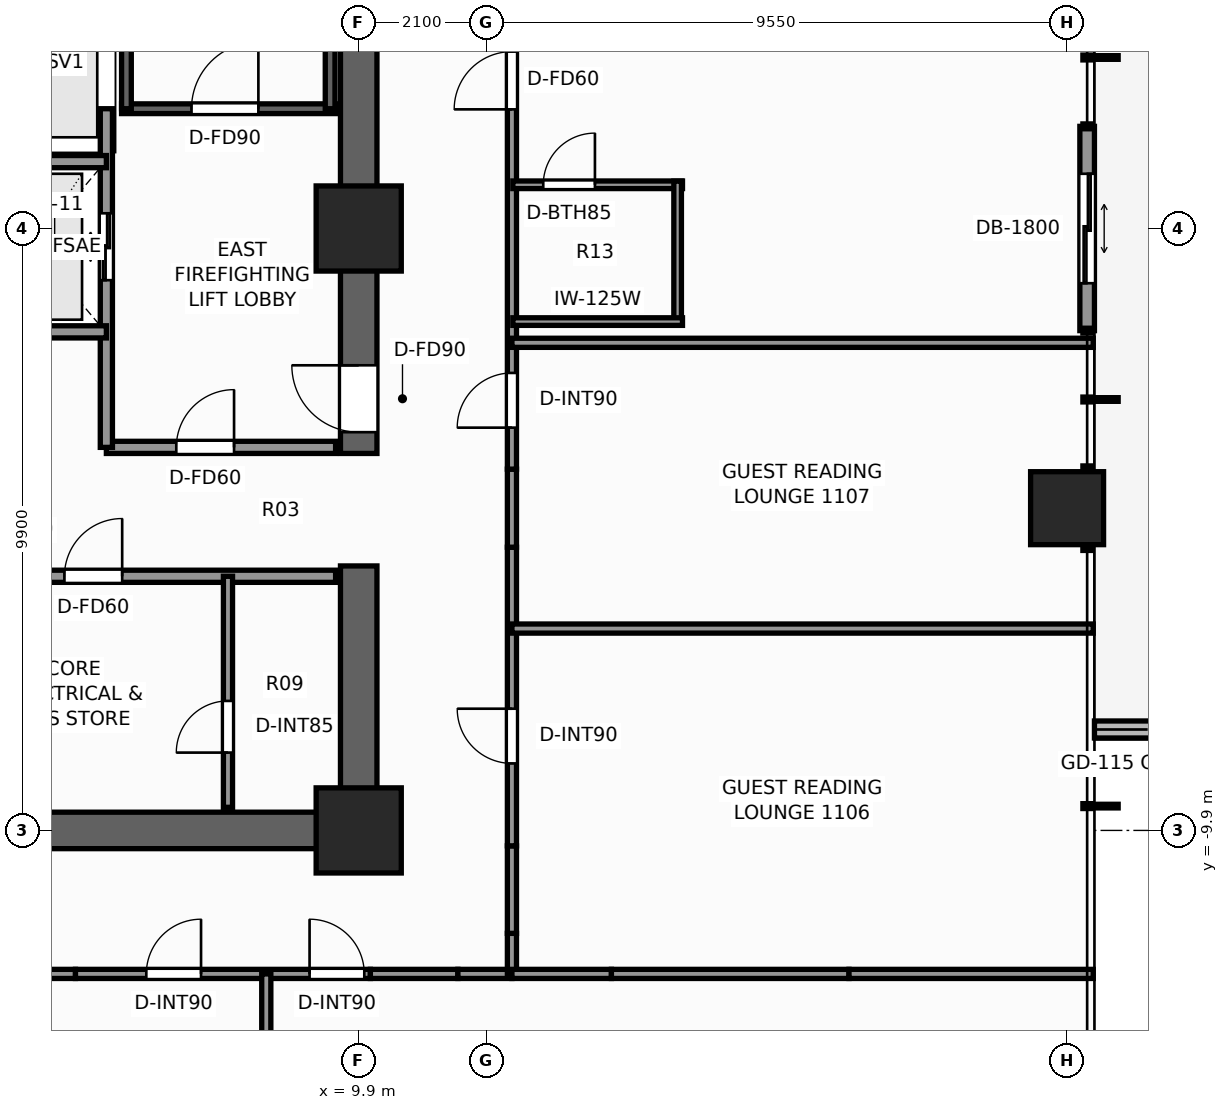
"""IFC4 building model, lengths in metres.
Left out: names, types, materials, properties, quantities, classifications, styles, units other than length and angle.
Written with IfcOpenShell. Run it as: python <this file> out.ifc"""

import sys

from ifc_helpers import new_model, si_unit, direction, frame, frame_2d, origin, origin_2d, place, context, subcontext, project, spatial, rectangle, extrude, element, fill, save


model = new_model("IFC4")
c1 = context("Model", 3, precision=1e-05, world=origin(), true_north=direction((0.0, 1.0)))
c2 = subcontext(c1, "Body", "Model", "MODEL_VIEW")
j1 = project(units=[si_unit("LENGTHUNIT", "METRE"), si_unit("PLANEANGLEUNIT", "RADIAN")], contexts=[c1])
p1 = place(None, origin())
s1 = spatial("IfcSite", under=j1, at=p1, CompositionType="ELEMENT")
p2 = place(p1, origin())
s2 = spatial("IfcBuilding", under=s1, at=p2, CompositionType="ELEMENT")
p3 = place(p2, frame((0.0, 0.0, 40.3)))
s3 = spatial("IfcBuildingStorey", under=s2, at=p3, CompositionType="ELEMENT", Elevation=40.3)
p4 = place(p3, frame((10.2, -9.9, 0.0), z_axis=(0.0, 0.0, 1.0), x_axis=(-1.0, 0.0, 0.0)))
e1 = element("IfcWall", 1, at=p4, inside=s3, PredefinedType="SHEAR", context=c2, shape_type="SweptSolid", body=[
    extrude(rectangle(XDim=12.06, YDim=0.6, at=frame_2d((6.03, 0.0))), origin(), (0.0, 0.0, 1.0), 3.3),
])
p5 = place(p3, frame((9.9, -9.6, 0.0), z_axis=(0.0, 0.0, 1.0), x_axis=(0.0, 1.0, 0.0)))
e2 = element("IfcWall", 2, at=p5, inside=s3, PredefinedType="SHEAR", context=c2, shape_type="SweptSolid", body=[
    extrude(rectangle(XDim=4.05, YDim=0.6, at=frame_2d((2.025, 0.0))), origin(), (0.0, 0.0, 1.0), 3.3),
])
p6 = place(p3, frame((9.9, -3.7, 0.0), z_axis=(0.0, 0.0, 1.0), x_axis=(0.0, 1.0, 0.0)))
e3 = element("IfcWall", 3, at=p6, inside=s3, PredefinedType="SHEAR", context=c2, shape_type="SweptSolid", body=[
    extrude(rectangle(XDim=13.3, YDim=0.6, at=frame_2d((6.65, 0.0))), origin(), (0.0, 0.0, 1.0), 3.3),
])
p7 = place(p6, frame((0.35, 0.0, 0.0)))
e4 = element("IfcOpeningElement", 4, at=p7, cuts=e3, PredefinedType="OPENING", context=c2, shape_type="SweptSolid", body=[
    extrude(rectangle(XDim=1.1, YDim=2.2, at=frame_2d((0.55, 1.1))), frame((0.0, 0.31, 0.0), z_axis=(0.0, -1.0, 0.0), x_axis=(1.0, 0.0, 0.0)), (0.0, 0.0, 1.0), 0.62),
])
for number, where, z_axis, x_axis in (
    (5, (9.9, -9.9, 0.0), (0.0, 0.0, 1.0), (1.0, 0.0, 0.0)),
    (6, (9.9, 0.0, 0.0), (0.0, 0.0, 1.0), (1.0, 0.0, 0.0)),
):
    element("IfcColumn", number, at=place(p3, frame(where, z_axis=z_axis, x_axis=x_axis)), inside=s3, PredefinedType="COLUMN", context=c2, shape_type="SweptSolid", body=[
        extrude(rectangle(XDim=1.4, YDim=1.4, at=origin_2d()), origin(), (0.0, 0.0, 1.0), 3.3),
    ])
p8 = place(p3, frame((21.55, -4.6, 0.0), z_axis=(0.0, 0.0, 1.0), x_axis=(1.0, 0.0, 0.0)))
e7 = element("IfcColumn", 7, at=p8, inside=s3, PredefinedType="COLUMN", context=c2, shape_type="SweptSolid", body=[
    extrude(rectangle(XDim=1.2, YDim=1.2, at=origin_2d()), origin(), (0.0, 0.0, 1.0), 3.3),
])
p9 = place(p3, frame((22.0, -8.24, -0.06), z_axis=(0.0, 0.0, 1.0), x_axis=(1.0, 0.0, 0.0)))
e8 = element("IfcWall", 8, at=p9, inside=s3, PredefinedType="PARAPET", context=c2, shape_type="SweptSolid", body=[
    extrude(rectangle(XDim=1.313, YDim=0.28, at=frame_2d((0.656, 0.0))), origin(), (0.0, 0.0, 1.0), 0.42),
])
p10 = place(p3, frame((21.88, 1.68, 0.0), z_axis=(0.0, 0.0, 1.0), x_axis=(0.0, -1.0, 0.0)))
e9 = element("IfcWall", 9, at=p10, inside=s3, PredefinedType="STANDARD", context=c2, shape_type="SweptSolid", body=[
    extrude(rectangle(XDim=3.36, YDim=0.24, at=frame_2d((1.68, 0.0))), origin(), (0.0, 0.0, 1.0), 3.06),
])
p11 = place(p10, frame((0.78, 0.0, 0.0)))
e10 = element("IfcOpeningElement", 10, at=p11, cuts=e9, PredefinedType="OPENING", context=c2, shape_type="SweptSolid", body=[
    extrude(rectangle(XDim=1.8, YDim=2.2, at=frame_2d((0.9, 1.1))), frame((0.0, 0.13, 0.0), z_axis=(0.0, -1.0, 0.0), x_axis=(1.0, 0.0, 0.0)), (0.0, 0.0, 1.0), 0.26),
])
p12 = place(p3, frame((6.0, 1.97, 0.0), z_axis=(0.0, 0.0, 1.0), x_axis=(1.0, 0.0, 0.0)))
e11 = element("IfcWall", 11, at=p12, inside=s3, PredefinedType="SHEAR", context=c2, shape_type="SweptSolid", body=[
    extrude(rectangle(XDim=3.52, YDim=0.16, at=frame_2d((1.76, 0.0))), origin(), (0.0, 0.0, 1.0), 3.3),
])
p13 = place(p12, frame((1.15, 0.0, 0.0)))
e12 = element("IfcOpeningElement", 12, at=p13, cuts=e11, PredefinedType="OPENING", context=c2, shape_type="SweptSolid", body=[
    extrude(rectangle(XDim=1.1, YDim=2.2, at=frame_2d((0.55, 1.1))), frame((0.0, 0.09, 0.0), z_axis=(0.0, -1.0, 0.0), x_axis=(1.0, 0.0, 0.0)), (0.0, 0.0, 1.0), 0.18),
])
for number, where, z_axis, x_axis in (
    (13, (6.08, 1.97, 0.0), (0.0, 0.0, 1.0), (0.0, 1.0, 0.0)),
    (14, (9.43, 1.97, 0.0), (0.0, 0.0, 1.0), (0.0, 1.0, 0.0)),
):
    element("IfcWall", number, at=place(p3, frame(where, z_axis=z_axis, x_axis=x_axis)), inside=s3, PredefinedType="SHEAR", context=c2, shape_type="SweptSolid", body=[
        extrude(rectangle(XDim=7.56, YDim=0.16, at=frame_2d((3.78, 0.0))), origin(), (0.0, 0.0, 1.0), 3.3),
    ])
p14 = place(p3, frame((5.75, -3.6, 0.0), z_axis=(0.0, 0.0, 1.0), x_axis=(1.0, 0.0, 0.0)))
e15 = element("IfcWall", 15, at=p14, inside=s3, PredefinedType="SOLIDWALL", context=c2, shape_type="SweptSolid", body=[
    extrude(rectangle(XDim=3.77, YDim=0.2, at=frame_2d((1.885, 0.0))), origin(), (0.0, 0.0, 1.0), 3.06),
])
p15 = place(p14, frame((1.15, 0.0, 0.0)))
e16 = element("IfcOpeningElement", 16, at=p15, cuts=e15, PredefinedType="OPENING", context=c2, shape_type="SweptSolid", body=[
    extrude(rectangle(XDim=0.95, YDim=2.06, at=frame_2d((0.475, 1.03))), frame((0.0, 0.11, 0.0), z_axis=(0.0, -1.0, 0.0), x_axis=(1.0, 0.0, 0.0)), (0.0, 0.0, 1.0), 0.22),
])
p16 = place(p3, frame((5.75, -3.6, 0.0), z_axis=(0.0, 0.0, 1.0), x_axis=(0.0, 1.0, 0.0)))
e17 = element("IfcWall", 17, at=p16, inside=s3, PredefinedType="SOLIDWALL", context=c2, shape_type="SweptSolid", body=[
    extrude(rectangle(XDim=5.57, YDim=0.2, at=frame_2d((2.785, 0.0))), origin(), (0.0, 0.0, 1.0), 3.06),
])
p17 = place(p16, frame((2.75, 0.0, 0.0)))
e18 = element("IfcOpeningElement", 18, at=p17, cuts=e17, PredefinedType="OPENING", context=c2, shape_type="SweptSolid", body=[
    extrude(rectangle(XDim=1.1, YDim=2.2, at=frame_2d((0.55, 1.1))), frame((0.0, 0.11, 0.0), z_axis=(0.0, -1.0, 0.0), x_axis=(1.0, 0.0, 0.0)), (0.0, 0.0, 1.0), 0.22),
])
for number, where, z_axis, x_axis in (
    (19, (3.35, -1.7, 0.0), (0.0, 0.0, 1.0), (1.0, 0.0, 0.0)),
    (20, (3.35, 1.1, 0.0), (0.0, 0.0, 1.0), (1.0, 0.0, 0.0)),
):
    element("IfcWall", number, at=place(p3, frame(where, z_axis=z_axis, x_axis=x_axis)), inside=s3, PredefinedType="SOLIDWALL", context=c2, shape_type="SweptSolid", body=[
        extrude(rectangle(XDim=2.4, YDim=0.2, at=frame_2d((1.2, 0.0))), origin(), (0.0, 0.0, 1.0), 3.06),
    ])
p18 = place(p3, frame((3.86, -5.72, 0.0), z_axis=(0.0, 0.0, 1.0), x_axis=(1.0, 0.0, 0.0)))
e21 = element("IfcWall", 21, at=p18, inside=s3, PredefinedType="SOLIDWALL", context=c2, shape_type="SweptSolid", body=[
    extrude(rectangle(XDim=5.66, YDim=0.2, at=frame_2d((2.83, 0.0))), origin(), (0.0, 0.0, 1.0), 3.06),
])
p19 = place(p18, frame((1.2, 0.0, 0.0)))
e22 = element("IfcOpeningElement", 22, at=p19, cuts=e21, PredefinedType="OPENING", context=c2, shape_type="SweptSolid", body=[
    extrude(rectangle(XDim=0.95, YDim=2.06, at=frame_2d((0.475, 1.03))), frame((0.0, 0.11, 0.0), z_axis=(0.0, -1.0, 0.0), x_axis=(1.0, 0.0, 0.0)), (0.0, 0.0, 1.0), 0.22),
])
p20 = place(p3, frame((7.75, -9.52, 0.0), z_axis=(0.0, 0.0, 1.0), x_axis=(0.0, 1.0, 0.0)))
e23 = element("IfcWall", 23, at=p20, inside=s3, PredefinedType="PARTITIONING", context=c2, shape_type="SweptSolid", body=[
    extrude(rectangle(XDim=3.8, YDim=0.15, at=frame_2d((1.9, 0.0))), origin(), (0.0, 0.0, 1.0), 3.06),
])
p21 = place(p20, frame((0.9, 0.0, 0.0)))
e24 = element("IfcOpeningElement", 24, at=p21, cuts=e23, PredefinedType="OPENING", context=c2, shape_type="SweptSolid", body=[
    extrude(rectangle(XDim=0.85, YDim=2.03, at=frame_2d((0.425, 1.015))), frame((0.0, 0.085, 0.0), z_axis=(0.0, -1.0, 0.0), x_axis=(1.0, 0.0, 0.0)), (0.0, 0.0, 1.0), 0.17),
])
p22 = place(p3, frame((3.958, -12.26, 0.0), z_axis=(0.0, 0.0, 1.0), x_axis=(1.0, 0.0, 0.0)))
e25 = element("IfcWall", 25, at=p22, inside=s3, PredefinedType="PARTITIONING", context=c2, shape_type="SweptSolid", body=[
    extrude(rectangle(XDim=1.284, YDim=0.15, at=frame_2d((0.642, 0.0))), origin(), (0.0, 0.0, 1.0), 1.245),
])
p23 = place(p3, frame((5.242, -12.26, 0.0), z_axis=(0.0, 0.0, 1.0), x_axis=(1.0, 0.0, 0.0)))
e26 = element("IfcWall", 26, at=p23, inside=s3, PredefinedType="PARTITIONING", context=c2, shape_type="SweptSolid", body=[
    extrude(rectangle(XDim=4.85, YDim=0.15, at=frame_2d((2.425, 0.0))), origin(), (0.0, 0.0, 1.0), 3.06),
])
p24 = place(p23, frame((1.165, 0.0, 0.0)))
e27 = element("IfcOpeningElement", 27, at=p24, cuts=e26, PredefinedType="OPENING", context=c2, shape_type="SweptSolid", body=[
    extrude(rectangle(XDim=0.9, YDim=2.06, at=frame_2d((0.45, 1.03))), frame((0.0, 0.085, 0.0), z_axis=(0.0, -1.0, 0.0), x_axis=(1.0, 0.0, 0.0)), (0.0, 0.0, 1.0), 0.17),
])
p25 = place(p23, frame((3.85, 0.0, 0.0)))
e28 = element("IfcOpeningElement", 28, at=p25, cuts=e26, PredefinedType="OPENING", context=c2, shape_type="SweptSolid", body=[
    extrude(rectangle(XDim=0.9, YDim=2.06, at=frame_2d((0.45, 1.03))), frame((0.0, 0.085, 0.0), z_axis=(0.0, -1.0, 0.0), x_axis=(1.0, 0.0, 0.0)), (0.0, 0.0, 1.0), 0.17),
])
p26 = place(p3, frame((10.092, -12.26, 0.0), z_axis=(0.0, 0.0, 1.0), x_axis=(1.0, 0.0, 0.0)))
e29 = element("IfcWall", 29, at=p26, inside=s3, PredefinedType="PARTITIONING", context=c2, shape_type="SweptSolid", body=[
    extrude(rectangle(XDim=1.439, YDim=0.15, at=frame_2d((0.72, 0.0))), origin(), (0.0, 0.0, 1.0), 1.245),
])
p27 = place(p3, frame((11.531, -12.26, 0.0), z_axis=(0.0, 0.0, 1.0), x_axis=(1.0, 0.0, 0.0)))
e30 = element("IfcWall", 30, at=p27, inside=s3, PredefinedType="PARTITIONING", context=c2, shape_type="SweptSolid", body=[
    extrude(rectangle(XDim=0.889, YDim=0.15, at=frame_2d((0.444, 0.0))), origin(), (0.0, 0.0, 1.0), 3.06),
])
p28 = place(p3, frame((12.42, -12.26, 0.0), z_axis=(0.0, 0.0, 1.0), x_axis=(0.0, 1.0, 0.0)))
e31 = element("IfcWall", 31, at=p28, inside=s3, PredefinedType="PARTITIONING", context=c2, shape_type="SweptSolid", body=[
    extrude(rectangle(XDim=0.667, YDim=0.15, at=frame_2d((0.333, 0.0))), origin(), (0.0, 0.0, 1.0), 3.06),
])
p29 = place(p3, frame((12.42, -11.593, 0.0), z_axis=(0.0, 0.0, 1.0), x_axis=(0.0, 1.0, 0.0)))
e32 = element("IfcWall", 32, at=p29, inside=s3, PredefinedType="PARTITIONING", context=c2, shape_type="SweptSolid", body=[
    extrude(rectangle(XDim=1.439, YDim=0.15, at=frame_2d((0.72, 0.0))), origin(), (0.0, 0.0, 1.0), 1.245),
])
p30 = place(p3, frame((12.42, -10.154, 0.0), z_axis=(0.0, 0.0, 1.0), x_axis=(0.0, 1.0, 0.0)))
e33 = element("IfcWall", 33, at=p30, inside=s3, PredefinedType="PARTITIONING", context=c2, shape_type="SweptSolid", body=[
    extrude(rectangle(XDim=4.912, YDim=0.15, at=frame_2d((2.456, 0.0))), origin(), (0.0, 0.0, 1.0), 3.06),
])
p31 = place(p30, frame((1.356, 0.0, 0.0)))
e34 = element("IfcOpeningElement", 34, at=p31, cuts=e33, PredefinedType="OPENING", context=c2, shape_type="SweptSolid", body=[
    extrude(rectangle(XDim=0.9, YDim=2.06, at=frame_2d((0.45, 1.03))), frame((0.0, 0.085, 0.0), z_axis=(0.0, -1.0, 0.0), x_axis=(1.0, 0.0, 0.0)), (0.0, 0.0, 1.0), 0.17),
])
p32 = place(p3, frame((12.42, -5.242, 0.0), z_axis=(0.0, 0.0, 1.0), x_axis=(0.0, 1.0, 0.0)))
e35 = element("IfcWall", 35, at=p32, inside=s3, PredefinedType="PARTITIONING", context=c2, shape_type="SweptSolid", body=[
    extrude(rectangle(XDim=1.284, YDim=0.15, at=frame_2d((0.642, 0.0))), origin(), (0.0, 0.0, 1.0), 1.245),
])
p33 = place(p3, frame((12.42, -3.958, 0.0), z_axis=(0.0, 0.0, 1.0), x_axis=(0.0, 1.0, 0.0)))
e36 = element("IfcWall", 36, at=p33, inside=s3, PredefinedType="PARTITIONING", context=c2, shape_type="SweptSolid", body=[
    extrude(rectangle(XDim=7.916, YDim=0.15, at=frame_2d((3.958, 0.0))), origin(), (0.0, 0.0, 1.0), 2.585),
])
p34 = place(p33, frame((0.682, 0.0, 0.0)))
e37 = element("IfcOpeningElement", 37, at=p34, cuts=e36, PredefinedType="OPENING", context=c2, shape_type="SweptSolid", body=[
    extrude(rectangle(XDim=0.9, YDim=2.06, at=frame_2d((0.45, 1.03))), frame((0.0, 0.085, 0.0), z_axis=(0.0, -1.0, 0.0), x_axis=(1.0, 0.0, 0.0)), (0.0, 0.0, 1.0), 0.17),
])
p35 = place(p33, frame((5.917, 0.0, 0.0)))
e38 = element("IfcOpeningElement", 38, at=p35, cuts=e36, PredefinedType="OPENING", context=c2, shape_type="SweptSolid", body=[
    extrude(rectangle(XDim=0.95, YDim=2.06, at=frame_2d((0.475, 1.03))), frame((0.0, 0.085, 0.0), z_axis=(0.0, -1.0, 0.0), x_axis=(1.0, 0.0, 0.0)), (0.0, 0.0, 1.0), 0.17),
])
p36 = place(p3, frame((12.42, -12.26, 0.0), z_axis=(0.0, 0.0, 1.0), x_axis=(1.0, 0.0, 0.0)))
e39 = element("IfcWall", 39, at=p36, inside=s3, PredefinedType="PARTITIONING", context=c2, shape_type="SweptSolid", body=[
    extrude(rectangle(XDim=1.636, YDim=0.15, at=frame_2d((0.818, 0.0))), origin(), (0.0, 0.0, 1.0), 3.06),
])
p37 = place(p3, frame((14.056, -12.26, 0.0), z_axis=(0.0, 0.0, 1.0), x_axis=(1.0, 0.0, 0.0)))
e40 = element("IfcWall", 40, at=p37, inside=s3, PredefinedType="PARTITIONING", context=c2, shape_type="SweptSolid", body=[
    extrude(rectangle(XDim=3.907, YDim=0.15, at=frame_2d((1.954, 0.0))), origin(), (0.0, 0.0, 1.0), 1.245),
])
p38 = place(p3, frame((17.963, -12.26, 0.0), z_axis=(0.0, 0.0, 1.0), x_axis=(1.0, 0.0, 0.0)))
e41 = element("IfcWall", 41, at=p38, inside=s3, PredefinedType="PARTITIONING", context=c2, shape_type="SweptSolid", body=[
    extrude(rectangle(XDim=4.017, YDim=0.15, at=frame_2d((2.008, 0.0))), origin(), (0.0, 0.0, 1.0), 2.429),
])
p39 = place(p3, frame((8.38, -21.98, 0.0), z_axis=(0.0, 0.0, 1.0), x_axis=(0.0, 1.0, 0.0)))
e42 = element("IfcWall", 42, at=p39, inside=s3, PredefinedType="PARTITIONING", context=c2, shape_type="SweptSolid", body=[
    extrude(rectangle(XDim=9.72, YDim=0.15, at=frame_2d((4.86, 0.0))), origin(), (0.0, 0.0, 1.0), 2.429),
])
for number, where, z_axis, x_axis in (
    (43, (12.42, -6.58, 0.0), (0.0, 0.0, 1.0), (1.0, 0.0, 0.0)),
    (44, (12.42, -1.88, 0.0), (0.0, 0.0, 1.0), (1.0, 0.0, 0.0)),
):
    element("IfcWall", number, at=place(p3, frame(where, z_axis=z_axis, x_axis=x_axis)), inside=s3, PredefinedType="PARTITIONING", context=c2, shape_type="SweptSolid", body=[
        extrude(rectangle(XDim=9.56, YDim=0.15, at=frame_2d((4.78, 0.0))), origin(), (0.0, 0.0, 1.0), 2.429),
    ])
p40 = place(p3, frame((12.435, 0.719, 0.0), z_axis=(0.0, 0.0, 1.0), x_axis=(1.0, 0.0, 0.0)))
e45 = element("IfcWall", 45, at=p40, inside=s3, PredefinedType="PARTITIONING", context=c2, shape_type="SweptSolid", body=[
    extrude(rectangle(XDim=2.79, YDim=0.125, at=frame_2d((1.395, 0.0))), origin(), (0.0, 0.0, 1.0), 3.06),
])
p41 = place(p40, frame((0.5, 0.0, 0.0)))
e46 = element("IfcOpeningElement", 46, at=p41, cuts=e45, PredefinedType="OPENING", context=c2, shape_type="SweptSolid", body=[
    extrude(rectangle(XDim=0.85, YDim=2.03, at=frame_2d((0.425, 1.015))), frame((0.0, 0.073, 0.0), z_axis=(0.0, -1.0, 0.0), x_axis=(1.0, 0.0, 0.0)), (0.0, 0.0, 1.0), 0.145),
])
p42 = place(p3, frame((15.145, -1.591, 0.0), z_axis=(0.0, 0.0, 1.0), x_axis=(0.0, 1.0, 0.0)))
e47 = element("IfcWall", 47, at=p42, inside=s3, PredefinedType="PARTITIONING", context=c2, shape_type="SweptSolid", body=[
    extrude(rectangle(XDim=2.37, YDim=0.125, at=frame_2d((1.185, 0.0))), origin(), (0.0, 0.0, 1.0), 2.585),
])
p43 = place(p3, frame((12.435, -1.531, 0.0), z_axis=(0.0, 0.0, 1.0), x_axis=(1.0, 0.0, 0.0)))
e48 = element("IfcWall", 48, at=p43, inside=s3, PredefinedType="PARTITIONING", context=c2, shape_type="SweptSolid", body=[
    extrude(rectangle(XDim=2.79, YDim=0.125, at=frame_2d((1.395, 0.0))), origin(), (0.0, 0.0, 1.0), 3.06),
])
p44 = place(p11, origin())
e49 = element("IfcDoor", 49, at=p44, inside=s3, OperationType="DOUBLE_DOOR_SLIDING", PredefinedType="DOOR", context=c2, shape_type="SweptSolid", body=[
    extrude(rectangle(XDim=1.8, YDim=2.2, at=frame_2d((0.9, 1.1))), frame((0.0, 0.025, 0.0), z_axis=(0.0, -1.0, 0.0), x_axis=(1.0, 0.0, 0.0)), (0.0, 0.0, 1.0), 0.05),
])
fill(e10, e49)
p45 = place(p13, origin())
e50 = element("IfcDoor", 50, at=p45, inside=s3, OperationType="SINGLE_SWING_RIGHT", PredefinedType="DOOR", context=c2, shape_type="SweptSolid", body=[
    extrude(rectangle(XDim=1.1, YDim=2.2, at=frame_2d((0.55, 1.1))), frame((0.0, 0.025, 0.0), z_axis=(0.0, -1.0, 0.0), x_axis=(1.0, 0.0, 0.0)), (0.0, 0.0, 1.0), 0.05),
])
fill(e12, e50)
p46 = place(p7, origin())
e51 = element("IfcDoor", 51, at=p46, inside=s3, OperationType="SINGLE_SWING_RIGHT", PredefinedType="DOOR", context=c2, shape_type="SweptSolid", body=[
    extrude(rectangle(XDim=1.1, YDim=2.2, at=frame_2d((0.55, 1.1))), frame((0.0, 0.025, 0.0), z_axis=(0.0, -1.0, 0.0), x_axis=(1.0, 0.0, 0.0)), (0.0, 0.0, 1.0), 0.05),
])
fill(e4, e51)
p47 = place(p17, origin())
e52 = element("IfcDoor", 52, at=p47, inside=s3, OperationType="DOUBLE_DOOR_SLIDING", PredefinedType="DOOR", context=c2, shape_type="SweptSolid", body=[
    extrude(rectangle(XDim=1.1, YDim=2.2, at=frame_2d((0.55, 1.1))), frame((0.0, 0.025, 0.0), z_axis=(0.0, -1.0, 0.0), x_axis=(1.0, 0.0, 0.0)), (0.0, 0.0, 1.0), 0.05),
])
fill(e18, e52)
p48 = place(p19, origin())
e53 = element("IfcDoor", 53, at=p48, inside=s3, OperationType="SINGLE_SWING_RIGHT", PredefinedType="DOOR", context=c2, shape_type="SweptSolid", body=[
    extrude(rectangle(XDim=0.95, YDim=2.06, at=frame_2d((0.475, 1.03))), frame((0.0, 0.025, 0.0), z_axis=(0.0, -1.0, 0.0), x_axis=(1.0, 0.0, 0.0)), (0.0, 0.0, 1.0), 0.05),
])
fill(e22, e53)
p49 = place(p21, origin())
e54 = element("IfcDoor", 54, at=p49, inside=s3, OperationType="SINGLE_SWING_LEFT", PredefinedType="DOOR", context=c2, shape_type="SweptSolid", body=[
    extrude(rectangle(XDim=0.85, YDim=2.03, at=frame_2d((0.425, 1.015))), frame((0.0, 0.025, 0.0), z_axis=(0.0, -1.0, 0.0), x_axis=(1.0, 0.0, 0.0)), (0.0, 0.0, 1.0), 0.05),
])
fill(e24, e54)
p50 = place(p15, origin())
e55 = element("IfcDoor", 55, at=p50, inside=s3, OperationType="SINGLE_SWING_RIGHT", PredefinedType="DOOR", context=c2, shape_type="SweptSolid", body=[
    extrude(rectangle(XDim=0.95, YDim=2.06, at=frame_2d((0.475, 1.03))), frame((0.0, 0.025, 0.0), z_axis=(0.0, -1.0, 0.0), x_axis=(1.0, 0.0, 0.0)), (0.0, 0.0, 1.0), 0.05),
])
fill(e16, e55)
p51 = place(p24, origin())
e56 = element("IfcDoor", 56, at=p51, inside=s3, OperationType="SINGLE_SWING_RIGHT", PredefinedType="DOOR", context=c2, shape_type="SweptSolid", body=[
    extrude(rectangle(XDim=0.9, YDim=2.06, at=frame_2d((0.45, 1.03))), frame((0.0, 0.025, 0.0), z_axis=(0.0, -1.0, 0.0), x_axis=(1.0, 0.0, 0.0)), (0.0, 0.0, 1.0), 0.05),
])
fill(e27, e56)
p52 = place(p25, origin())
e57 = element("IfcDoor", 57, at=p52, inside=s3, OperationType="SINGLE_SWING_LEFT", PredefinedType="DOOR", context=c2, shape_type="SweptSolid", body=[
    extrude(rectangle(XDim=0.9, YDim=2.06, at=frame_2d((0.45, 1.03))), frame((0.0, 0.025, 0.0), z_axis=(0.0, -1.0, 0.0), x_axis=(1.0, 0.0, 0.0)), (0.0, 0.0, 1.0), 0.05),
])
fill(e28, e57)
p53 = place(p31, origin())
e58 = element("IfcDoor", 58, at=p53, inside=s3, OperationType="SINGLE_SWING_RIGHT", PredefinedType="DOOR", context=c2, shape_type="SweptSolid", body=[
    extrude(rectangle(XDim=0.9, YDim=2.06, at=frame_2d((0.45, 1.03))), frame((0.0, 0.025, 0.0), z_axis=(0.0, -1.0, 0.0), x_axis=(1.0, 0.0, 0.0)), (0.0, 0.0, 1.0), 0.05),
])
fill(e34, e58)
p54 = place(p34, origin())
e59 = element("IfcDoor", 59, at=p54, inside=s3, OperationType="SINGLE_SWING_LEFT", PredefinedType="DOOR", context=c2, shape_type="SweptSolid", body=[
    extrude(rectangle(XDim=0.9, YDim=2.06, at=frame_2d((0.45, 1.03))), frame((0.0, 0.025, 0.0), z_axis=(0.0, -1.0, 0.0), x_axis=(1.0, 0.0, 0.0)), (0.0, 0.0, 1.0), 0.05),
])
fill(e37, e59)
p55 = place(p41, origin())
e60 = element("IfcDoor", 60, at=p55, inside=s3, OperationType="SINGLE_SWING_RIGHT", PredefinedType="DOOR", context=c2, shape_type="SweptSolid", body=[
    extrude(rectangle(XDim=0.85, YDim=2.03, at=frame_2d((0.425, 1.015))), frame((0.0, 0.025, 0.0), z_axis=(0.0, -1.0, 0.0), x_axis=(1.0, 0.0, 0.0)), (0.0, 0.0, 1.0), 0.05),
])
fill(e46, e60)
p56 = place(p35, origin())
e61 = element("IfcDoor", 61, at=p56, inside=s3, OperationType="SINGLE_SWING_LEFT", PredefinedType="DOOR", context=c2, shape_type="SweptSolid", body=[
    extrude(rectangle(XDim=0.95, YDim=2.06, at=frame_2d((0.475, 1.03))), frame((0.0, 0.025, 0.0), z_axis=(0.0, -1.0, 0.0), x_axis=(1.0, 0.0, 0.0)), (0.0, 0.0, 1.0), 0.05),
])
fill(e38, e61)
save(model, sys.argv[1])
